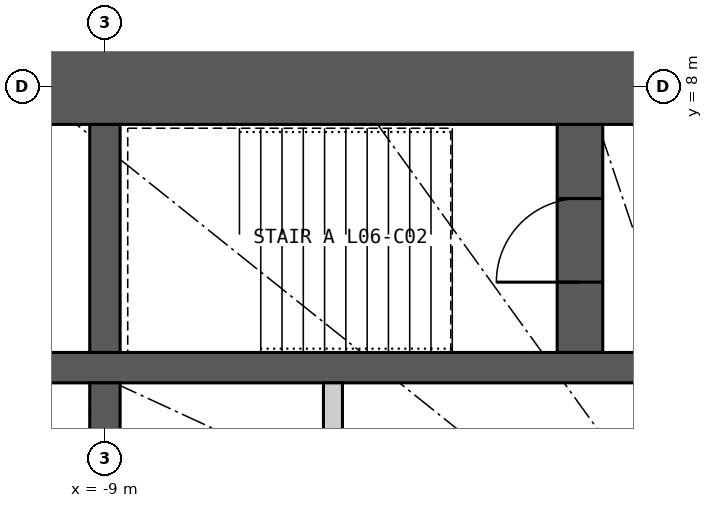
"""IFC4 building model, lengths in metres.
Left out: names, types, materials, properties, quantities, classifications, styles, units other than length and angle.
Written with IfcOpenShell. Run it as: python <this file> out.ifc"""

import sys

from ifc_helpers import new_model, si_unit, direction, frame, frame_2d, origin, place, context, subcontext, project, spatial, rectangle, extrude, element, fill, save


model = new_model("IFC4")
c1 = context("Model", 3, precision=1e-05, world=origin(), true_north=direction((0.0, 1.0)))
c2 = subcontext(c1, "Body", "Model", "MODEL_VIEW")
j1 = project(units=[si_unit("LENGTHUNIT", "METRE"), si_unit("PLANEANGLEUNIT", "RADIAN")], contexts=[c1])
p1 = place(None, origin())
s1 = spatial("IfcSite", under=j1, at=p1, CompositionType="ELEMENT")
p2 = place(p1, origin())
s2 = spatial("IfcBuilding", under=s1, at=p2, CompositionType="ELEMENT")
p3 = place(p2, frame((0.0, 0.0, 32.7)))
s3 = spatial("IfcBuildingStorey", under=s2, at=p3, CompositionType="ELEMENT", Elevation=32.7)
p4 = place(p3, frame((-12.5, 8.0, 0.0), z_axis=(0.0, 0.0, 1.0), x_axis=(1.0, 0.0, 0.0)))
e1 = element("IfcWall", 1, at=p4, inside=s3, PredefinedType="SHEAR", context=c2, shape_type="SweptSolid", body=[
    extrude(rectangle(XDim=25.0, YDim=1.0, at=frame_2d((12.5, 0.0))), origin(), (0.0, 0.0, 1.0), 3.3),
])
p5 = place(p4, frame((11.2, 0.0, 0.0)))
e2 = element("IfcOpeningElement", 2, at=p5, cuts=e1, PredefinedType="OPENING", context=c2, shape_type="SweptSolid", body=[
    extrude(rectangle(XDim=1.2, YDim=2.2, at=frame_2d((0.6, 1.1))), frame((0.0, 0.51, 0.0), z_axis=(0.0, -1.0, 0.0), x_axis=(1.0, 0.0, 0.0)), (0.0, 0.0, 1.0), 1.02),
])
p6 = place(p4, frame((18.8, 0.0, 0.0)))
e3 = element("IfcOpeningElement", 3, at=p6, cuts=e1, PredefinedType="OPENING", context=c2, shape_type="SweptSolid", body=[
    extrude(rectangle(XDim=0.9, YDim=2.2, at=frame_2d((0.45, 1.1))), frame((0.0, 0.51, 0.0), z_axis=(0.0, -1.0, 0.0), x_axis=(1.0, 0.0, 0.0)), (0.0, 0.0, 1.0), 1.02),
])
p7 = place(p3, frame((-11.5, 4.3, 0.0), z_axis=(0.0, 0.0, 1.0), x_axis=(1.0, 0.0, 0.0)))
e4 = element("IfcWall", 4, at=p7, inside=s3, PredefinedType="SHEAR", context=c2, shape_type="SweptSolid", body=[
    extrude(rectangle(XDim=23.0, YDim=0.4, at=frame_2d((11.5, 0.0))), origin(), (0.0, 0.0, 1.0), 3.3),
])
p8 = place(p3, frame((-9.0, 4.5, 0.0), z_axis=(0.0, 0.0, 1.0), x_axis=(0.0, 1.0, 0.0)))
e5 = element("IfcWall", 5, at=p8, inside=s3, PredefinedType="SHEAR", context=c2, shape_type="SweptSolid", body=[
    extrude(rectangle(XDim=3.0, YDim=0.4, at=frame_2d((1.5, 0.0))), origin(), (0.0, 0.0, 1.0), 3.3),
])
p9 = place(p3, frame((-9.0, 1.75, 0.0), z_axis=(0.0, 0.0, 1.0), x_axis=(0.0, 1.0, 0.0)))
e6 = element("IfcWall", 6, at=p9, inside=s3, PredefinedType="SHEAR", context=c2, shape_type="SweptSolid", body=[
    extrude(rectangle(XDim=2.35, YDim=0.4, at=frame_2d((1.175, 0.0))), origin(), (0.0, 0.0, 1.0), 3.3),
])
p10 = place(p3, frame((-2.75, 4.5, 0.0), z_axis=(0.0, 0.0, 1.0), x_axis=(0.0, 1.0, 0.0)))
e7 = element("IfcWall", 7, at=p10, inside=s3, PredefinedType="SHEAR", context=c2, shape_type="SweptSolid", body=[
    extrude(rectangle(XDim=3.0, YDim=0.6, at=frame_2d((1.5, 0.0))), origin(), (0.0, 0.0, 1.0), 3.3),
])
p11 = place(p10, frame((0.925, 0.0, 0.0)))
e8 = element("IfcOpeningElement", 8, at=p11, cuts=e7, PredefinedType="OPENING", context=c2, shape_type="SweptSolid", body=[
    extrude(rectangle(XDim=1.1, YDim=2.2, at=frame_2d((0.55, 1.1))), frame((0.0, 0.31, 0.0), z_axis=(0.0, -1.0, 0.0), x_axis=(1.0, 0.0, 0.0)), (0.0, 0.0, 1.0), 0.62),
])
p12 = place(p3, frame((-6.0, 1.75, 0.0), z_axis=(0.0, 0.0, 1.0), x_axis=(0.0, 1.0, 0.0)))
e9 = element("IfcWall", 9, at=p12, inside=s3, PredefinedType="PARTITIONING", context=c2, shape_type="SweptSolid", body=[
    extrude(rectangle(XDim=2.35, YDim=0.25, at=frame_2d((1.175, 0.0))), origin(), (0.0, 0.0, 1.0), 3.3),
])
p13 = place(p11, origin())
e10 = element("IfcDoor", 10, at=p13, inside=s3, OperationType="SINGLE_SWING_LEFT", PredefinedType="DOOR", context=c2, shape_type="SweptSolid", body=[
    extrude(rectangle(XDim=1.1, YDim=2.2, at=frame_2d((0.55, 1.1))), frame((0.0, 0.025, 0.0), z_axis=(0.0, -1.0, 0.0), x_axis=(1.0, 0.0, 0.0)), (0.0, 0.0, 1.0), 0.05),
])
fill(e8, e10)
save(model, sys.argv[1])
